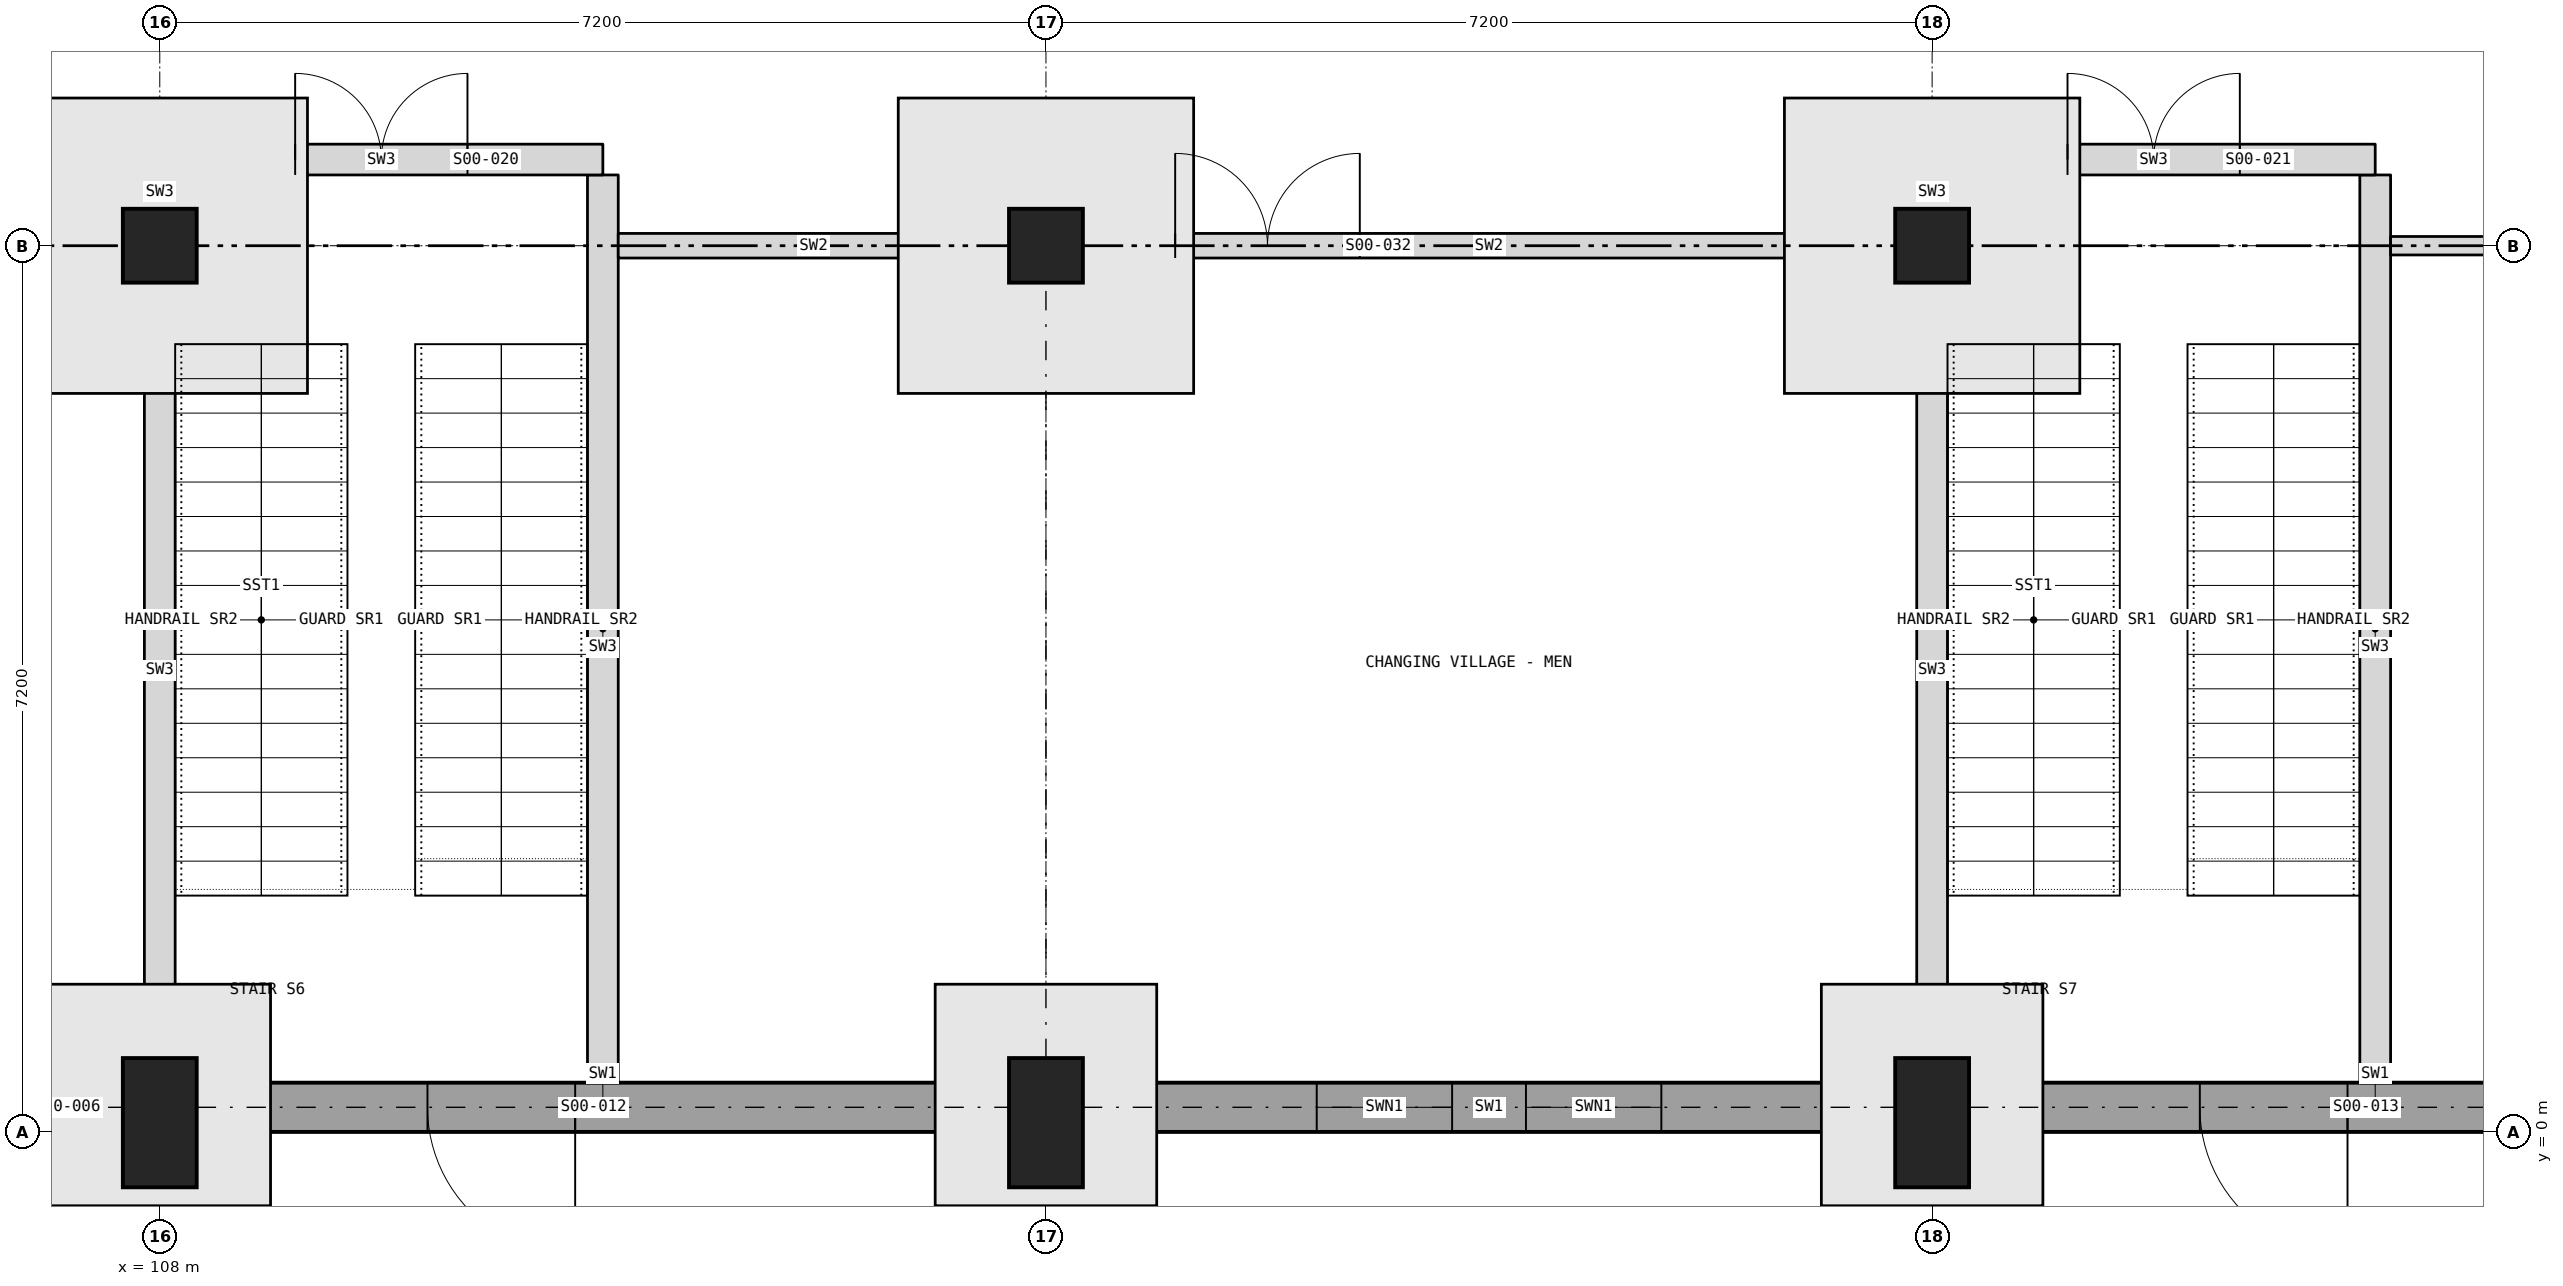
"""IFC4 building model, lengths in metres.
Left out: names, types, materials, properties, quantities, classifications, styles, units other than length and angle.
Written with IfcOpenShell. Run it as: python <this file> out.ifc"""

import sys

from ifc_helpers import new_model, si_unit, direction, frame, frame_2d, origin, origin_2d, place, context, subcontext, project, spatial, rectangle, extrude, element, fill, save


model = new_model("IFC4")
c1 = context("Model", 3, precision=1e-05, world=origin(), true_north=direction((0.0, 1.0)))
c2 = subcontext(c1, "Body", "Model", "MODEL_VIEW")
j1 = project(units=[si_unit("LENGTHUNIT", "METRE"), si_unit("PLANEANGLEUNIT", "RADIAN")], contexts=[c1])
p1 = place(None, origin())
s1 = spatial("IfcSite", under=j1, at=p1, CompositionType="ELEMENT")
p2 = place(p1, origin())
s2 = spatial("IfcBuilding", under=s1, at=p2, CompositionType="ELEMENT")
p3 = place(p2, origin())
s3 = spatial("IfcBuildingStorey", under=s2, at=p3, CompositionType="ELEMENT", Elevation=0.0)
p4 = place(p3, frame((108.0, 0.075, -0.45), z_axis=(0.0, 0.0, 1.0), x_axis=(1.0, 0.0, 0.0)))
e1 = element("IfcColumn", 1, at=p4, inside=s3, PredefinedType="COLUMN", context=c2, shape_type="SweptSolid", body=[
    extrude(rectangle(XDim=0.6, YDim=1.05, at=origin_2d()), origin(), (0.0, 0.0, 1.0), 6.45),
])
p5 = place(p3, frame((108.0, 7.2, -0.405), z_axis=(0.0, 0.0, 1.0), x_axis=(1.0, 0.0, 0.0)))
e2 = element("IfcColumn", 2, at=p5, inside=s3, PredefinedType="COLUMN", context=c2, shape_type="SweptSolid", body=[
    extrude(rectangle(XDim=0.6, YDim=0.6, at=origin_2d()), origin(), (0.0, 0.0, 1.0), 6.405),
])
p6 = place(p3, frame((115.2, 0.075, -0.45), z_axis=(0.0, 0.0, 1.0), x_axis=(1.0, 0.0, 0.0)))
e3 = element("IfcColumn", 3, at=p6, inside=s3, PredefinedType="COLUMN", context=c2, shape_type="SweptSolid", body=[
    extrude(rectangle(XDim=0.6, YDim=1.05, at=origin_2d()), origin(), (0.0, 0.0, 1.0), 6.45),
])
p7 = place(p3, frame((115.2, 7.2, -0.405), z_axis=(0.0, 0.0, 1.0), x_axis=(1.0, 0.0, 0.0)))
e4 = element("IfcColumn", 4, at=p7, inside=s3, PredefinedType="COLUMN", context=c2, shape_type="SweptSolid", body=[
    extrude(rectangle(XDim=0.6, YDim=0.6, at=origin_2d()), origin(), (0.0, 0.0, 1.0), 6.405),
])
p8 = place(p3, frame((122.4, 0.075, -0.45), z_axis=(0.0, 0.0, 1.0), x_axis=(1.0, 0.0, 0.0)))
e5 = element("IfcColumn", 5, at=p8, inside=s3, PredefinedType="COLUMN", context=c2, shape_type="SweptSolid", body=[
    extrude(rectangle(XDim=0.6, YDim=1.05, at=origin_2d()), origin(), (0.0, 0.0, 1.0), 6.45),
])
p9 = place(p3, frame((122.4, 7.2, -0.405), z_axis=(0.0, 0.0, 1.0), x_axis=(1.0, 0.0, 0.0)))
e6 = element("IfcColumn", 6, at=p9, inside=s3, PredefinedType="COLUMN", context=c2, shape_type="SweptSolid", body=[
    extrude(rectangle(XDim=0.6, YDim=0.6, at=origin_2d()), origin(), (0.0, 0.0, 1.0), 6.405),
])
p10 = place(p3, frame((101.1, 0.2, 0.0), z_axis=(0.0, 0.0, 1.0), x_axis=(1.0, 0.0, 0.0)))
e7 = element("IfcWall", 7, at=p10, inside=s3, PredefinedType="SOLIDWALL", context=c2, shape_type="SweptSolid", body=[
    extrude(rectangle(XDim=6.6, YDim=0.4, at=frame_2d((3.3, 0.0))), origin(), (0.0, 0.0, 1.0), 5.1),
])
p11 = place(p10, frame((0.6, 0.0, 0.0)))
e8 = element("IfcOpeningElement", 8, at=p11, cuts=e7, PredefinedType="OPENING", context=c2, shape_type="SweptSolid", body=[
    extrude(rectangle(XDim=2.0, YDim=2.4, at=frame_2d((1.0, 1.2))), frame((0.0, 0.21, 0.0), z_axis=(0.0, -1.0, 0.0), x_axis=(1.0, 0.0, 0.0)), (0.0, 0.0, 1.0), 0.42),
])
p12 = place(p10, frame((4.0, 0.0, 0.0)))
e9 = element("IfcOpeningElement", 9, at=p12, cuts=e7, PredefinedType="OPENING", context=c2, shape_type="SweptSolid", body=[
    extrude(rectangle(XDim=2.0, YDim=2.4, at=frame_2d((1.0, 1.2))), frame((0.0, 0.21, 0.0), z_axis=(0.0, -1.0, 0.0), x_axis=(1.0, 0.0, 0.0)), (0.0, 0.0, 1.0), 0.42),
])
p13 = place(p3, frame((108.3, 0.2, 0.0), z_axis=(0.0, 0.0, 1.0), x_axis=(1.0, 0.0, 0.0)))
e10 = element("IfcWall", 10, at=p13, inside=s3, PredefinedType="SOLIDWALL", context=c2, shape_type="SweptSolid", body=[
    extrude(rectangle(XDim=6.6, YDim=0.4, at=frame_2d((3.3, 0.0))), origin(), (0.0, 0.0, 1.0), 5.1),
])
p14 = place(p13, frame((1.875, 0.0, 0.0)))
e11 = element("IfcOpeningElement", 11, at=p14, cuts=e10, PredefinedType="OPENING", context=c2, shape_type="SweptSolid", body=[
    extrude(rectangle(XDim=1.2, YDim=2.1, at=frame_2d((0.6, 1.05))), frame((0.0, 0.21, 0.0), z_axis=(0.0, -1.0, 0.0), x_axis=(1.0, 0.0, 0.0)), (0.0, 0.0, 1.0), 0.42),
])
p15 = place(p3, frame((115.5, 0.2, 0.0), z_axis=(0.0, 0.0, 1.0), x_axis=(1.0, 0.0, 0.0)))
e12 = element("IfcWall", 12, at=p15, inside=s3, PredefinedType="SOLIDWALL", context=c2, shape_type="SweptSolid", body=[
    extrude(rectangle(XDim=6.6, YDim=0.4, at=frame_2d((3.3, 0.0))), origin(), (0.0, 0.0, 1.0), 5.1),
])
p16 = place(p15, frame((1.9, 0.0, 2.4)))
e13 = element("IfcOpeningElement", 13, at=p16, cuts=e12, PredefinedType="OPENING", context=c2, shape_type="SweptSolid", body=[
    extrude(rectangle(XDim=1.1, YDim=1.2, at=frame_2d((0.55, 0.6))), frame((0.0, 0.21, 0.0), z_axis=(0.0, -1.0, 0.0), x_axis=(1.0, 0.0, 0.0)), (0.0, 0.0, 1.0), 0.42),
])
p17 = place(p15, frame((3.6, 0.0, 2.4)))
e14 = element("IfcOpeningElement", 14, at=p17, cuts=e12, PredefinedType="OPENING", context=c2, shape_type="SweptSolid", body=[
    extrude(rectangle(XDim=1.1, YDim=1.2, at=frame_2d((0.55, 0.6))), frame((0.0, 0.21, 0.0), z_axis=(0.0, -1.0, 0.0), x_axis=(1.0, 0.0, 0.0)), (0.0, 0.0, 1.0), 0.42),
])
p18 = place(p3, frame((122.7, 0.2, 0.0), z_axis=(0.0, 0.0, 1.0), x_axis=(1.0, 0.0, 0.0)))
e15 = element("IfcWall", 15, at=p18, inside=s3, PredefinedType="SOLIDWALL", context=c2, shape_type="SweptSolid", body=[
    extrude(rectangle(XDim=6.6, YDim=0.4, at=frame_2d((3.3, 0.0))), origin(), (0.0, 0.0, 1.0), 5.1),
])
p19 = place(p18, frame((1.875, 0.0, 0.0)))
e16 = element("IfcOpeningElement", 16, at=p19, cuts=e15, PredefinedType="OPENING", context=c2, shape_type="SweptSolid", body=[
    extrude(rectangle(XDim=1.2, YDim=2.1, at=frame_2d((0.6, 1.05))), frame((0.0, 0.21, 0.0), z_axis=(0.0, -1.0, 0.0), x_axis=(1.0, 0.0, 0.0)), (0.0, 0.0, 1.0), 0.42),
])
p20 = place(p3, frame((108.0, 0.6, 0.0), z_axis=(0.0, 0.0, 1.0), x_axis=(0.0, 1.0, 0.0)))
e17 = element("IfcWall", 17, at=p20, inside=s3, PredefinedType="SOLIDWALL", context=c2, shape_type="SweptSolid", body=[
    extrude(rectangle(XDim=6.3, YDim=0.25, at=frame_2d((3.15, 0.0))), origin(), (0.0, 0.0, 1.0), 5.7),
])
p21 = place(p3, frame((108.0, 7.5, 0.0), z_axis=(0.0, 0.0, 1.0), x_axis=(0.0, 1.0, 0.0)))
e18 = element("IfcWall", 18, at=p21, inside=s3, PredefinedType="SOLIDWALL", context=c2, shape_type="SweptSolid", body=[
    extrude(rectangle(XDim=0.275, YDim=0.25, at=frame_2d((0.137, 0.0))), origin(), (0.0, 0.0, 1.0), 5.7),
])
p22 = place(p3, frame((111.6, 0.4, 0.0), z_axis=(0.0, 0.0, 1.0), x_axis=(0.0, 1.0, 0.0)))
e19 = element("IfcWall", 19, at=p22, inside=s3, PredefinedType="SOLIDWALL", context=c2, shape_type="SweptSolid", body=[
    extrude(rectangle(XDim=7.375, YDim=0.25, at=frame_2d((3.688, 0.0))), origin(), (0.0, 0.0, 1.0), 5.7),
])
p23 = place(p3, frame((122.4, 0.6, 0.0), z_axis=(0.0, 0.0, 1.0), x_axis=(0.0, 1.0, 0.0)))
e20 = element("IfcWall", 20, at=p23, inside=s3, PredefinedType="SOLIDWALL", context=c2, shape_type="SweptSolid", body=[
    extrude(rectangle(XDim=6.3, YDim=0.25, at=frame_2d((3.15, 0.0))), origin(), (0.0, 0.0, 1.0), 5.7),
])
p24 = place(p3, frame((122.4, 7.5, 0.0), z_axis=(0.0, 0.0, 1.0), x_axis=(0.0, 1.0, 0.0)))
e21 = element("IfcWall", 21, at=p24, inside=s3, PredefinedType="SOLIDWALL", context=c2, shape_type="SweptSolid", body=[
    extrude(rectangle(XDim=0.275, YDim=0.25, at=frame_2d((0.137, 0.0))), origin(), (0.0, 0.0, 1.0), 5.7),
])
p25 = place(p3, frame((126.0, 0.4, 0.0), z_axis=(0.0, 0.0, 1.0), x_axis=(0.0, 1.0, 0.0)))
e22 = element("IfcWall", 22, at=p25, inside=s3, PredefinedType="SOLIDWALL", context=c2, shape_type="SweptSolid", body=[
    extrude(rectangle(XDim=7.375, YDim=0.25, at=frame_2d((3.688, 0.0))), origin(), (0.0, 0.0, 1.0), 5.7),
])
p26 = place(p3, frame((101.1, 7.2, 0.0), z_axis=(0.0, 0.0, 1.0), x_axis=(1.0, 0.0, 0.0)))
e23 = element("IfcWall", 23, at=p26, inside=s3, PredefinedType="PARTITIONING", context=c2, shape_type="SweptSolid", body=[
    extrude(rectangle(XDim=6.6, YDim=0.2, at=frame_2d((3.3, 0.0))), origin(), (0.0, 0.0, 1.0), 5.7),
])
p27 = place(p26, frame((0.6, 0.0, 0.0)))
e24 = element("IfcOpeningElement", 24, at=p27, cuts=e23, PredefinedType="OPENING", context=c2, shape_type="SweptSolid", body=[
    extrude(rectangle(XDim=1.8, YDim=2.1, at=frame_2d((0.9, 1.05))), frame((0.0, 0.11, 0.0), z_axis=(0.0, -1.0, 0.0), x_axis=(1.0, 0.0, 0.0)), (0.0, 0.0, 1.0), 0.22),
])
p28 = place(p3, frame((126.125, 7.2, 0.0), z_axis=(0.0, 0.0, 1.0), x_axis=(1.0, 0.0, 0.0)))
e25 = element("IfcWall", 25, at=p28, inside=s3, PredefinedType="PARTITIONING", context=c2, shape_type="SweptSolid", body=[
    extrude(rectangle(XDim=3.175, YDim=0.15, at=frame_2d((1.587, 0.0))), origin(), (0.0, 0.0, 1.0), 5.7),
])
p29 = place(p3, frame((111.725, 7.2, 0.0), z_axis=(0.0, 0.0, 1.0), x_axis=(1.0, 0.0, 0.0)))
e26 = element("IfcWall", 26, at=p29, inside=s3, PredefinedType="PARTITIONING", context=c2, shape_type="SweptSolid", body=[
    extrude(rectangle(XDim=3.175, YDim=0.2, at=frame_2d((1.587, 0.0))), origin(), (0.0, 0.0, 1.0), 5.7),
])
p30 = place(p3, frame((115.5, 7.2, 0.0), z_axis=(0.0, 0.0, 1.0), x_axis=(1.0, 0.0, 0.0)))
e27 = element("IfcWall", 27, at=p30, inside=s3, PredefinedType="PARTITIONING", context=c2, shape_type="SweptSolid", body=[
    extrude(rectangle(XDim=6.6, YDim=0.2, at=frame_2d((3.3, 0.0))), origin(), (0.0, 0.0, 1.0), 5.7),
])
p31 = place(p30, frame((0.75, 0.0, 0.0)))
e28 = element("IfcOpeningElement", 28, at=p31, cuts=e27, PredefinedType="OPENING", context=c2, shape_type="SweptSolid", body=[
    extrude(rectangle(XDim=1.5, YDim=2.1, at=frame_2d((0.75, 1.05))), frame((0.0, 0.11, 0.0), z_axis=(0.0, -1.0, 0.0), x_axis=(1.0, 0.0, 0.0)), (0.0, 0.0, 1.0), 0.22),
])
p32 = place(p3, frame((108.0, 7.9, 0.0), z_axis=(0.0, 0.0, 1.0), x_axis=(1.0, 0.0, 0.0)))
e29 = element("IfcWall", 29, at=p32, inside=s3, PredefinedType="SOLIDWALL", context=c2, shape_type="SweptSolid", body=[
    extrude(rectangle(XDim=3.6, YDim=0.25, at=frame_2d((1.8, 0.0))), origin(), (0.0, 0.0, 1.0), 5.7),
])
p33 = place(p32, frame((1.1, 0.0, 0.0)))
e30 = element("IfcOpeningElement", 30, at=p33, cuts=e29, PredefinedType="OPENING", context=c2, shape_type="SweptSolid", body=[
    extrude(rectangle(XDim=1.4, YDim=2.1, at=frame_2d((0.7, 1.05))), frame((0.0, 0.135, 0.0), z_axis=(0.0, -1.0, 0.0), x_axis=(1.0, 0.0, 0.0)), (0.0, 0.0, 1.0), 0.27),
])
p34 = place(p3, frame((122.4, 7.9, 0.0), z_axis=(0.0, 0.0, 1.0), x_axis=(1.0, 0.0, 0.0)))
e31 = element("IfcWall", 31, at=p34, inside=s3, PredefinedType="SOLIDWALL", context=c2, shape_type="SweptSolid", body=[
    extrude(rectangle(XDim=3.6, YDim=0.25, at=frame_2d((1.8, 0.0))), origin(), (0.0, 0.0, 1.0), 5.7),
])
p35 = place(p34, frame((1.1, 0.0, 0.0)))
e32 = element("IfcOpeningElement", 32, at=p35, cuts=e31, PredefinedType="OPENING", context=c2, shape_type="SweptSolid", body=[
    extrude(rectangle(XDim=1.4, YDim=2.1, at=frame_2d((0.7, 1.05))), frame((0.0, 0.135, 0.0), z_axis=(0.0, -1.0, 0.0), x_axis=(1.0, 0.0, 0.0)), (0.0, 0.0, 1.0), 0.27),
])
p36 = place(p16, origin())
e33 = element("IfcWindow", 33, at=p36, inside=s3, PartitioningType="DOUBLE_PANEL_VERTICAL", PredefinedType="WINDOW", context=c2, shape_type="SweptSolid", body=[
    extrude(rectangle(XDim=1.1, YDim=1.2, at=frame_2d((0.55, 0.6))), frame((0.0, 0.16, 0.0), z_axis=(0.0, -1.0, 0.0), x_axis=(1.0, 0.0, 0.0)), (0.0, 0.0, 1.0), 0.06),
])
fill(e13, e33)
p37 = place(p17, origin())
e34 = element("IfcWindow", 34, at=p37, inside=s3, PartitioningType="DOUBLE_PANEL_VERTICAL", PredefinedType="WINDOW", context=c2, shape_type="SweptSolid", body=[
    extrude(rectangle(XDim=1.1, YDim=1.2, at=frame_2d((0.55, 0.6))), frame((0.0, 0.16, 0.0), z_axis=(0.0, -1.0, 0.0), x_axis=(1.0, 0.0, 0.0)), (0.0, 0.0, 1.0), 0.06),
])
fill(e14, e34)
p38 = place(p14, frame((1.2, 0.0, 0.0), z_axis=(0.0, 0.0, 1.0), x_axis=(-1.0, 0.0, 0.0)))
e35 = element("IfcDoor", 35, at=p38, inside=s3, OperationType="SINGLE_SWING_LEFT", PredefinedType="DOOR", context=c2, shape_type="SweptSolid", body=[
    extrude(rectangle(XDim=1.2, YDim=2.1, at=frame_2d((0.6, 1.05))), frame((0.0, 0.025, 0.0), z_axis=(0.0, -1.0, 0.0), x_axis=(1.0, 0.0, 0.0)), (0.0, 0.0, 1.0), 0.05),
])
fill(e11, e35)
p39 = place(p19, frame((1.2, 0.0, 0.0), z_axis=(0.0, 0.0, 1.0), x_axis=(-1.0, 0.0, 0.0)))
e36 = element("IfcDoor", 36, at=p39, inside=s3, OperationType="SINGLE_SWING_LEFT", PredefinedType="DOOR", context=c2, shape_type="SweptSolid", body=[
    extrude(rectangle(XDim=1.2, YDim=2.1, at=frame_2d((0.6, 1.05))), frame((0.0, 0.025, 0.0), z_axis=(0.0, -1.0, 0.0), x_axis=(1.0, 0.0, 0.0)), (0.0, 0.0, 1.0), 0.05),
])
fill(e16, e36)
p40 = place(p33, origin())
e37 = element("IfcDoor", 37, at=p40, inside=s3, OperationType="DOUBLE_DOOR_SINGLE_SWING", PredefinedType="DOOR", context=c2, shape_type="SweptSolid", body=[
    extrude(rectangle(XDim=1.4, YDim=2.1, at=frame_2d((0.7, 1.05))), frame((0.0, 0.025, 0.0), z_axis=(0.0, -1.0, 0.0), x_axis=(1.0, 0.0, 0.0)), (0.0, 0.0, 1.0), 0.05),
])
fill(e30, e37)
p41 = place(p35, origin())
e38 = element("IfcDoor", 38, at=p41, inside=s3, OperationType="DOUBLE_DOOR_SINGLE_SWING", PredefinedType="DOOR", context=c2, shape_type="SweptSolid", body=[
    extrude(rectangle(XDim=1.4, YDim=2.1, at=frame_2d((0.7, 1.05))), frame((0.0, 0.025, 0.0), z_axis=(0.0, -1.0, 0.0), x_axis=(1.0, 0.0, 0.0)), (0.0, 0.0, 1.0), 0.05),
])
fill(e32, e38)
p42 = place(p31, origin())
e39 = element("IfcDoor", 39, at=p42, inside=s3, OperationType="DOUBLE_DOOR_SINGLE_SWING", PredefinedType="DOOR", context=c2, shape_type="SweptSolid", body=[
    extrude(rectangle(XDim=1.5, YDim=2.1, at=frame_2d((0.75, 1.05))), frame((0.0, 0.025, 0.0), z_axis=(0.0, -1.0, 0.0), x_axis=(1.0, 0.0, 0.0)), (0.0, 0.0, 1.0), 0.05),
])
fill(e28, e39)
save(model, sys.argv[1])
